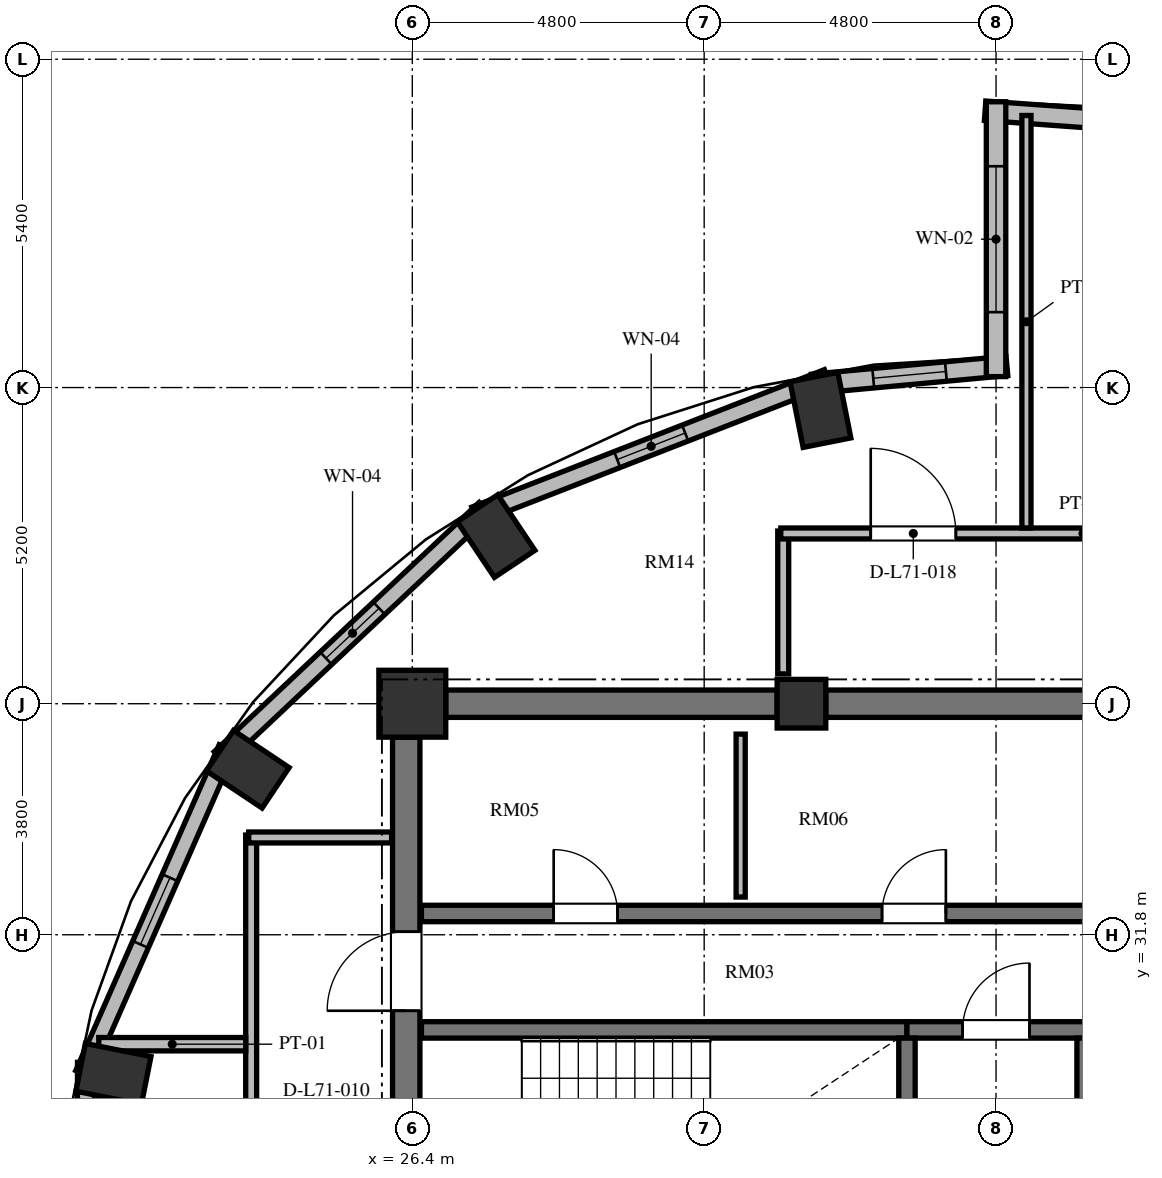
"""IFC4 building model, lengths in metres.
Left out: names, types, materials, properties, quantities, classifications, styles, units other than length and angle.
Written with IfcOpenShell. Run it as: python <this file> out.ifc"""

import sys

from ifc_helpers import new_model, si_unit, direction, frame, frame_2d, origin, origin_2d, place, context, subcontext, project, spatial, rectangle, extrude, element, fill, save


model = new_model("IFC4")
c1 = context("Model", 3, precision=1e-05, world=origin(), true_north=direction((0.0, 1.0)))
c2 = subcontext(c1, "Body", "Model", "MODEL_VIEW")
j1 = project(units=[si_unit("LENGTHUNIT", "METRE"), si_unit("PLANEANGLEUNIT", "RADIAN")], contexts=[c1])
p1 = place(None, origin())
s1 = spatial("IfcSite", under=j1, at=p1, CompositionType="ELEMENT")
p2 = place(p1, origin())
s2 = spatial("IfcBuilding", under=s1, at=p2, CompositionType="ELEMENT")
p3 = place(p2, frame((0.0, 0.0, 273.264)))
s3 = spatial("IfcBuildingStorey", under=s2, at=p3, CompositionType="ELEMENT", Elevation=273.264)
for number, where, z_axis, x_axis in (
    (1, (33.113, 40.433, 0.0), (0.0, 0.0, 1.0), (-0.195, 0.981, 0.0)),
    (2, (27.778, 38.357, 0.0), (0.0, 0.0, 1.0), (-0.556, 0.831, 0.0)),
    (3, (23.694, 34.522, 0.0), (0.0, 0.0, 1.0), (-0.831, 0.556, 0.0)),
    (4, (21.484, 29.512, 0.0), (0.0, 0.0, 1.0), (-0.981, 0.195, 0.0)),
):
    element("IfcColumn", number, at=place(p3, frame(where, z_axis=z_axis, x_axis=x_axis)), inside=s3, PredefinedType="COLUMN", context=c2, shape_type="SweptSolid", body=[
        extrude(rectangle(XDim=1.1, YDim=0.8, at=origin_2d()), origin(), (0.0, 0.0, 1.0), 3.648),
    ])
p4 = place(p3, frame((32.8, 35.6, 0.0), z_axis=(0.0, 0.0, 1.0), x_axis=(1.0, 0.0, 0.0)))
e5 = element("IfcColumn", 5, at=p4, inside=s3, PredefinedType="COLUMN", context=c2, shape_type="SweptSolid", body=[
    extrude(rectangle(XDim=0.8, YDim=0.8, at=origin_2d()), origin(), (0.0, 0.0, 1.0), 3.648),
])
p5 = place(p3, frame((26.4, 35.6, 0.0), z_axis=(0.0, 0.0, 1.0), x_axis=(1.0, 0.0, 0.0)))
e6 = element("IfcColumn", 6, at=p5, inside=s3, PredefinedType="COLUMN", context=c2, shape_type="SweptSolid", body=[
    extrude(rectangle(XDim=1.1, YDim=1.1, at=origin_2d()), origin(), (0.0, 0.0, 1.0), 3.648),
])
p6 = place(p3, frame((26.3, 20.95, 0.0), z_axis=(0.0, 0.0, 1.0), x_axis=(0.0, 1.0, 0.0)))
e7 = element("IfcWall", 7, at=p6, inside=s3, PredefinedType="SHEAR", context=c2, shape_type="SweptSolid", body=[
    extrude(rectangle(XDim=14.1, YDim=0.45, at=frame_2d((7.05, 0.0))), origin(), (0.0, 0.0, 1.0), 3.648),
])
p7 = place(p6, frame((6.5, 0.0, 0.0)))
e8 = element("IfcOpeningElement", 8, at=p7, cuts=e7, PredefinedType="OPENING", context=c2, shape_type="SweptSolid", body=[
    extrude(rectangle(XDim=1.2, YDim=2.15, at=frame_2d((0.6, 1.075))), frame((0.0, 0.235, 0.0), z_axis=(0.0, -1.0, 0.0), x_axis=(1.0, 0.0, 0.0)), (0.0, 0.0, 1.0), 0.47),
])
p8 = place(p6, frame((9.6, 0.0, 0.0)))
e9 = element("IfcOpeningElement", 9, at=p8, cuts=e7, PredefinedType="OPENING", context=c2, shape_type="SweptSolid", body=[
    extrude(rectangle(XDim=1.3, YDim=2.2, at=frame_2d((0.65, 1.1))), frame((0.0, 0.235, 0.0), z_axis=(0.0, -1.0, 0.0), x_axis=(1.0, 0.0, 0.0)), (0.0, 0.0, 1.0), 0.47),
])
p9 = place(p6, frame((3.26, 0.0, 0.0)))
e10 = element("IfcOpeningElement", 10, at=p9, cuts=e7, PredefinedType="OPENING", context=c2, shape_type="SweptSolid", body=[
    extrude(rectangle(XDim=1.3, YDim=2.2, at=frame_2d((0.65, 1.1))), frame((0.0, 0.235, 0.0), z_axis=(0.0, -1.0, 0.0), x_axis=(1.0, 0.0, 0.0)), (0.0, 0.0, 1.0), 0.47),
])
p10 = place(p3, frame((26.95, 35.6, 0.0), z_axis=(0.0, 0.0, 1.0), x_axis=(1.0, 0.0, 0.0)))
e11 = element("IfcWall", 11, at=p10, inside=s3, PredefinedType="SHEAR", context=c2, shape_type="SweptSolid", body=[
    extrude(rectangle(XDim=5.45, YDim=0.45, at=frame_2d((2.725, 0.0))), origin(), (0.0, 0.0, 1.0), 3.648),
])
p11 = place(p3, frame((33.2, 35.6, 0.0), z_axis=(0.0, 0.0, 1.0), x_axis=(1.0, 0.0, 0.0)))
e12 = element("IfcWall", 12, at=p11, inside=s3, PredefinedType="SHEAR", context=c2, shape_type="SweptSolid", body=[
    extrude(rectangle(XDim=5.6, YDim=0.45, at=frame_2d((2.8, 0.0))), origin(), (0.0, 0.0, 1.0), 3.648),
])
p12 = place(p3, frame((33.228, 40.964, 0.0), z_axis=(0.0, 0.0, 1.0), x_axis=(-0.931716550814, -0.36318627306, 0.0)))
e13 = element("IfcWall", 13, at=p12, inside=s3, PredefinedType="SOLIDWALL", context=c2, shape_type="SweptSolid", body=[
    extrude(rectangle(XDim=6.224, YDim=0.28, at=frame_2d((3.112, 0.0))), origin(), (0.0, 0.0, 1.0), 3.448),
])
p13 = place(p12, frame((2.512, 0.0, 0.85)))
e14 = element("IfcOpeningElement", 14, at=p13, cuts=e13, PredefinedType="OPENING", context=c2, shape_type="SweptSolid", body=[
    extrude(rectangle(XDim=1.2, YDim=1.8, at=frame_2d((0.6, 0.9))), frame((0.0, 0.15, 0.0), z_axis=(0.0, -1.0, 0.0), x_axis=(1.0, 0.0, 0.0)), (0.0, 0.0, 1.0), 0.3),
])
p14 = place(p3, frame((27.595, 38.808, 0.0), z_axis=(0.0, 0.0, 1.0), x_axis=(-0.728251519923, -0.685309947199, 0.0)))
e15 = element("IfcWall", 15, at=p14, inside=s3, PredefinedType="SOLIDWALL", context=c2, shape_type="SweptSolid", body=[
    extrude(rectangle(XDim=5.981, YDim=0.28, at=frame_2d((2.99, 0.0))), origin(), (0.0, 0.0, 1.0), 3.448),
])
p15 = place(p14, frame((2.391, 0.0, 0.85)))
e16 = element("IfcOpeningElement", 16, at=p15, cuts=e15, PredefinedType="OPENING", context=c2, shape_type="SweptSolid", body=[
    extrude(rectangle(XDim=1.2, YDim=1.8, at=frame_2d((0.6, 0.9))), frame((0.0, 0.15, 0.0), z_axis=(0.0, -1.0, 0.0), x_axis=(1.0, 0.0, 0.0)), (0.0, 0.0, 1.0), 0.3),
])
p16 = place(p3, frame((23.352, 34.869, 0.0), z_axis=(0.0, 0.0, 1.0), x_axis=(-0.402882523888, -0.915251698685, 0.0)))
e17 = element("IfcWall", 17, at=p16, inside=s3, PredefinedType="SOLIDWALL", context=c2, shape_type="SweptSolid", body=[
    extrude(rectangle(XDim=5.856, YDim=0.28, at=frame_2d((2.928, 0.0))), origin(), (0.0, 0.0, 1.0), 3.448),
])
p17 = place(p16, frame((2.328, 0.0, 0.85)))
e18 = element("IfcOpeningElement", 18, at=p17, cuts=e17, PredefinedType="OPENING", context=c2, shape_type="SweptSolid", body=[
    extrude(rectangle(XDim=1.2, YDim=1.8, at=frame_2d((0.6, 0.9))), frame((0.0, 0.15, 0.0), z_axis=(0.0, -1.0, 0.0), x_axis=(1.0, 0.0, 0.0)), (0.0, 0.0, 1.0), 0.3),
])
p18 = place(p3, frame((21.033, 29.701, 0.0), z_axis=(0.0, 0.0, 1.0), x_axis=(0.0, -1.0, 0.0)))
e19 = element("IfcWall", 19, at=p18, inside=s3, PredefinedType="SOLIDWALL", context=c2, shape_type="SweptSolid", body=[
    extrude(rectangle(XDim=5.803, YDim=0.28, at=frame_2d((2.901, 0.0))), origin(), (0.0, 0.0, 1.0), 3.448),
])
p19 = place(p18, frame((2.187, 0.0, 0.85)))
e20 = element("IfcOpeningElement", 20, at=p19, cuts=e19, PredefinedType="OPENING", context=c2, shape_type="SweptSolid", body=[
    extrude(rectangle(XDim=1.2, YDim=1.8, at=frame_2d((0.6, 0.9))), frame((0.0, 0.15, 0.0), z_axis=(0.0, -1.0, 0.0), x_axis=(1.0, 0.0, 0.0)), (0.0, 0.0, 1.0), 0.3),
])
p20 = place(p3, frame((40.35, 45.026, 0.0), z_axis=(0.0, 0.0, 1.0), x_axis=(-0.997412917451, 0.071885131294, 0.0)))
e21 = element("IfcWall", 21, at=p20, inside=s3, PredefinedType="SOLIDWALL", context=c2, shape_type="SweptSolid", body=[
    extrude(rectangle(XDim=4.541, YDim=0.32, at=frame_2d((2.271, 0.0))), origin(), (0.0, 0.0, 1.0), 3.448),
])
p21 = place(p20, frame((1.67, 0.0, 0.85)))
e22 = element("IfcOpeningElement", 22, at=p21, cuts=e21, PredefinedType="OPENING", context=c2, shape_type="SweptSolid", body=[
    extrude(rectangle(XDim=1.2, YDim=2.2, at=frame_2d((0.6, 1.1))), frame((0.0, 0.17, 0.0), z_axis=(0.0, -1.0, 0.0), x_axis=(1.0, 0.0, 0.0)), (0.0, 0.0, 1.0), 0.34),
])
p22 = place(p3, frame((36.179, 41.156, 0.0), z_axis=(0.0, 0.0, 1.0), x_axis=(-0.995736155144, -0.092247001792, 0.0)))
e23 = element("IfcWall", 23, at=p22, inside=s3, PredefinedType="SOLIDWALL", context=c2, shape_type="SweptSolid", body=[
    extrude(rectangle(XDim=3.216, YDim=0.32, at=frame_2d((1.608, 0.0))), origin(), (0.0, 0.0, 1.0), 3.448),
])
p23 = place(p22, frame((1.008, 0.0, 0.85)))
e24 = element("IfcOpeningElement", 24, at=p23, cuts=e23, PredefinedType="OPENING", context=c2, shape_type="SweptSolid", body=[
    extrude(rectangle(XDim=1.2, YDim=1.8, at=frame_2d((0.6, 0.9))), frame((0.0, 0.17, 0.0), z_axis=(0.0, -1.0, 0.0), x_axis=(1.0, 0.0, 0.0)), (0.0, 0.0, 1.0), 0.34),
])
p24 = place(p3, frame((36.0, 45.5, 0.0), z_axis=(0.0, 0.0, 1.0), x_axis=(0.0, -1.0, 0.0)))
e25 = element("IfcWall", 25, at=p24, inside=s3, PredefinedType="SOLIDWALL", context=c2, shape_type="SweptSolid", body=[
    extrude(rectangle(XDim=4.52, YDim=0.32, at=frame_2d((2.26, 0.0))), origin(), (0.0, 0.0, 1.0), 3.448),
])
p25 = place(p24, frame((1.06, 0.0, 0.84)))
e26 = element("IfcOpeningElement", 26, at=p25, cuts=e25, PredefinedType="OPENING", context=c2, shape_type="SweptSolid", body=[
    extrude(rectangle(XDim=2.4, YDim=2.04, at=frame_2d((1.2, 1.02))), frame((0.0, 0.17, 0.0), z_axis=(0.0, -1.0, 0.0), x_axis=(1.0, 0.0, 0.0)), (0.0, 0.0, 1.0), 0.34),
])
p26 = place(p3, frame((26.55, 30.235, 0.0), z_axis=(0.0, 0.0, 1.0), x_axis=(1.0, 0.0, 0.0)))
e27 = element("IfcWall", 27, at=p26, inside=s3, PredefinedType="SHEAR", context=c2, shape_type="SweptSolid", body=[
    extrude(rectangle(XDim=7.985, YDim=0.27, at=frame_2d((3.992, 0.0))), origin(), (0.0, 0.0, 1.0), 3.648),
])
p27 = place(p3, frame((34.535, 30.235, 0.0), z_axis=(0.0, 0.0, 1.0), x_axis=(1.0, 0.0, 0.0)))
e28 = element("IfcWall", 28, at=p27, inside=s3, PredefinedType="SHEAR", context=c2, shape_type="SweptSolid", body=[
    extrude(rectangle(XDim=2.93, YDim=0.27, at=frame_2d((1.465, 0.0))), origin(), (0.0, 0.0, 1.0), 3.648),
])
p28 = place(p27, frame((0.915, 0.0, 0.0)))
e29 = element("IfcOpeningElement", 29, at=p28, cuts=e28, PredefinedType="OPENING", context=c2, shape_type="SweptSolid", body=[
    extrude(rectangle(XDim=1.1, YDim=2.15, at=frame_2d((0.55, 1.075))), frame((0.0, 0.145, 0.0), z_axis=(0.0, -1.0, 0.0), x_axis=(1.0, 0.0, 0.0)), (0.0, 0.0, 1.0), 0.29),
])
for number, where, z_axis, x_axis in (
    (30, (34.535, 26.02, 0.0), (0.0, 0.0, 1.0), (0.0, 1.0, 0.0)),
    (31, (37.465, 26.02, 0.0), (0.0, 0.0, 1.0), (0.0, 1.0, 0.0)),
):
    element("IfcWall", number, at=place(p3, frame(where, z_axis=z_axis, x_axis=x_axis)), inside=s3, PredefinedType="SHEAR", context=c2, shape_type="SweptSolid", body=[
        extrude(rectangle(XDim=4.08, YDim=0.27, at=frame_2d((2.04, 0.0))), origin(), (0.0, 0.0, 1.0), 3.648),
    ])
p29 = place(p3, frame((26.55, 32.15, 0.0), z_axis=(0.0, 0.0, 1.0), x_axis=(1.0, 0.0, 0.0)))
e32 = element("IfcWall", 32, at=p29, inside=s3, PredefinedType="SHEAR", context=c2, shape_type="SweptSolid", body=[
    extrude(rectangle(XDim=16.4, YDim=0.27, at=frame_2d((8.2, 0.0))), origin(), (0.0, 0.0, 1.0), 3.648),
])
p30 = place(p29, frame((2.175, 0.0, 0.0)))
e33 = element("IfcOpeningElement", 33, at=p30, cuts=e32, PredefinedType="OPENING", context=c2, shape_type="SweptSolid", body=[
    extrude(rectangle(XDim=1.05, YDim=2.15, at=frame_2d((0.525, 1.075))), frame((0.0, 0.145, 0.0), z_axis=(0.0, -1.0, 0.0), x_axis=(1.0, 0.0, 0.0)), (0.0, 0.0, 1.0), 0.29),
])
p31 = place(p29, frame((7.575, 0.0, 0.0)))
e34 = element("IfcOpeningElement", 34, at=p31, cuts=e32, PredefinedType="OPENING", context=c2, shape_type="SweptSolid", body=[
    extrude(rectangle(XDim=1.05, YDim=2.15, at=frame_2d((0.525, 1.075))), frame((0.0, 0.145, 0.0), z_axis=(0.0, -1.0, 0.0), x_axis=(1.0, 0.0, 0.0)), (0.0, 0.0, 1.0), 0.29),
])
p32 = place(p29, frame((11.9, 0.0, 0.0)))
e35 = element("IfcOpeningElement", 35, at=p32, cuts=e32, PredefinedType="OPENING", context=c2, shape_type="SweptSolid", body=[
    extrude(rectangle(XDim=1.1, YDim=2.2, at=frame_2d((0.55, 1.1))), frame((0.0, 0.145, 0.0), z_axis=(0.0, -1.0, 0.0), x_axis=(1.0, 0.0, 0.0)), (0.0, 0.0, 1.0), 0.29),
])
p33 = place(p29, frame((14.5, 0.0, 0.0)))
e36 = element("IfcOpeningElement", 36, at=p33, cuts=e32, PredefinedType="OPENING", context=c2, shape_type="SweptSolid", body=[
    extrude(rectangle(XDim=1.1, YDim=2.2, at=frame_2d((0.55, 1.1))), frame((0.0, 0.145, 0.0), z_axis=(0.0, -1.0, 0.0), x_axis=(1.0, 0.0, 0.0)), (0.0, 0.0, 1.0), 0.29),
])
p34 = place(p3, frame((31.8, 32.42, 0.0), z_axis=(0.0, 0.0, 1.0), x_axis=(0.0, 1.0, 0.0)))
e37 = element("IfcWall", 37, at=p34, inside=s3, PredefinedType="PARTITIONING", context=c2, shape_type="SweptSolid", body=[
    extrude(rectangle(XDim=2.68, YDim=0.15, at=frame_2d((1.34, 0.0))), origin(), (0.0, 0.0, 1.0), 3.448),
])
p35 = place(p3, frame((32.5, 36.09, 0.0), z_axis=(0.0, 0.0, 1.0), x_axis=(0.0, 1.0, 0.0)))
e38 = element("IfcWall", 38, at=p35, inside=s3, PredefinedType="PARTITIONING", context=c2, shape_type="SweptSolid", body=[
    extrude(rectangle(XDim=2.35, YDim=0.18, at=frame_2d((1.175, 0.0))), origin(), (0.0, 0.0, 1.0), 3.448),
])
p36 = place(p3, frame((32.46, 38.4, 0.0), z_axis=(0.0, 0.0, 1.0), x_axis=(1.0, 0.0, 0.0)))
e39 = element("IfcWall", 39, at=p36, inside=s3, PredefinedType="PARTITIONING", context=c2, shape_type="SweptSolid", body=[
    extrude(rectangle(XDim=19.879, YDim=0.18, at=frame_2d((9.939, 0.0))), origin(), (0.0, 0.0, 1.0), 3.073),
])
p37 = place(p36, frame((16.101, 0.0, 0.0)))
e40 = element("IfcOpeningElement", 40, at=p37, cuts=e39, PredefinedType="OPENING", context=c2, shape_type="SweptSolid", body=[
    extrude(rectangle(XDim=1.4, YDim=2.2, at=frame_2d((0.7, 1.1))), frame((0.0, 0.1, 0.0), z_axis=(0.0, -1.0, 0.0), x_axis=(1.0, 0.0, 0.0)), (0.0, 0.0, 1.0), 0.2),
])
p38 = place(p36, frame((10.84, 0.0, 0.0)))
e41 = element("IfcOpeningElement", 41, at=p38, cuts=e39, PredefinedType="OPENING", context=c2, shape_type="SweptSolid", body=[
    extrude(rectangle(XDim=1.4, YDim=2.2, at=frame_2d((0.7, 1.1))), frame((0.0, 0.1, 0.0), z_axis=(0.0, -1.0, 0.0), x_axis=(1.0, 0.0, 0.0)), (0.0, 0.0, 1.0), 0.2),
])
p39 = place(p36, frame((5.84, 0.0, 0.0)))
e42 = element("IfcOpeningElement", 42, at=p39, cuts=e39, PredefinedType="OPENING", context=c2, shape_type="SweptSolid", body=[
    extrude(rectangle(XDim=1.4, YDim=2.2, at=frame_2d((0.7, 1.1))), frame((0.0, 0.1, 0.0), z_axis=(0.0, -1.0, 0.0), x_axis=(1.0, 0.0, 0.0)), (0.0, 0.0, 1.0), 0.2),
])
p40 = place(p36, frame((1.479, 0.0, 0.0)))
e43 = element("IfcOpeningElement", 43, at=p40, cuts=e39, PredefinedType="OPENING", context=c2, shape_type="SweptSolid", body=[
    extrude(rectangle(XDim=1.4, YDim=2.2, at=frame_2d((0.7, 1.1))), frame((0.0, 0.1, 0.0), z_axis=(0.0, -1.0, 0.0), x_axis=(1.0, 0.0, 0.0)), (0.0, 0.0, 1.0), 0.2),
])
p41 = place(p3, frame((23.75, 22.16, 0.0), z_axis=(0.0, 0.0, 1.0), x_axis=(0.0, 1.0, 0.0)))
e44 = element("IfcWall", 44, at=p41, inside=s3, PredefinedType="PARTITIONING", context=c2, shape_type="SweptSolid", body=[
    extrude(rectangle(XDim=11.28, YDim=0.18, at=frame_2d((5.64, 0.0))), origin(), (0.0, 0.0, 1.0), 3.448),
])
p42 = place(p41, frame((5.123, 0.0, 0.0)))
e45 = element("IfcOpeningElement", 45, at=p42, cuts=e44, PredefinedType="OPENING", context=c2, shape_type="SweptSolid", body=[
    extrude(rectangle(XDim=1.4, YDim=2.2, at=frame_2d((0.7, 1.1))), frame((0.0, 0.1, 0.0), z_axis=(0.0, -1.0, 0.0), x_axis=(1.0, 0.0, 0.0)), (0.0, 0.0, 1.0), 0.2),
])
p43 = place(p41, frame((1.379, 0.0, 0.0)))
e46 = element("IfcOpeningElement", 46, at=p43, cuts=e44, PredefinedType="OPENING", context=c2, shape_type="SweptSolid", body=[
    extrude(rectangle(XDim=1.4, YDim=2.2, at=frame_2d((0.7, 1.1))), frame((0.0, 0.1, 0.0), z_axis=(0.0, -1.0, 0.0), x_axis=(1.0, 0.0, 0.0)), (0.0, 0.0, 1.0), 0.2),
])
p44 = place(p3, frame((23.71, 33.4, 0.0), z_axis=(0.0, 0.0, 1.0), x_axis=(1.0, 0.0, 0.0)))
e47 = element("IfcWall", 47, at=p44, inside=s3, PredefinedType="PARTITIONING", context=c2, shape_type="SweptSolid", body=[
    extrude(rectangle(XDim=2.35, YDim=0.18, at=frame_2d((1.175, 0.0))), origin(), (0.0, 0.0, 1.0), 3.448),
])
p45 = place(p3, frame((21.244, 30.0, 0.0), z_axis=(0.0, 0.0, 1.0), x_axis=(1.0, 0.0, 0.0)))
e48 = element("IfcWall", 48, at=p45, inside=s3, PredefinedType="PARTITIONING", context=c2, shape_type="SweptSolid", body=[
    extrude(rectangle(XDim=2.416, YDim=0.22, at=frame_2d((1.208, 0.0))), origin(), (0.0, 0.0, 1.0), 3.448),
])
p46 = place(p3, frame((36.5, 38.49, 0.0), z_axis=(0.0, 0.0, 1.0), x_axis=(0.0, 1.0, 0.0)))
e49 = element("IfcWall", 49, at=p46, inside=s3, PredefinedType="PARTITIONING", context=c2, shape_type="SweptSolid", body=[
    extrude(rectangle(XDim=6.785, YDim=0.15, at=frame_2d((3.392, 0.0))), origin(), (0.0, 0.0, 1.0), 3.448),
])
p47 = place(p13, origin())
e50 = element("IfcWindow", 50, at=p47, inside=s3, PartitioningType="SINGLE_PANEL", PredefinedType="WINDOW", context=c2, shape_type="SweptSolid", body=[
    extrude(rectangle(XDim=1.2, YDim=1.8, at=frame_2d((0.6, 0.9))), frame((0.0, 0.03, 0.0), z_axis=(0.0, -1.0, 0.0), x_axis=(1.0, 0.0, 0.0)), (0.0, 0.0, 1.0), 0.06),
])
fill(e14, e50)
p48 = place(p15, origin())
e51 = element("IfcWindow", 51, at=p48, inside=s3, PartitioningType="SINGLE_PANEL", PredefinedType="WINDOW", context=c2, shape_type="SweptSolid", body=[
    extrude(rectangle(XDim=1.2, YDim=1.8, at=frame_2d((0.6, 0.9))), frame((0.0, 0.03, 0.0), z_axis=(0.0, -1.0, 0.0), x_axis=(1.0, 0.0, 0.0)), (0.0, 0.0, 1.0), 0.06),
])
fill(e16, e51)
p49 = place(p17, origin())
e52 = element("IfcWindow", 52, at=p49, inside=s3, PartitioningType="SINGLE_PANEL", PredefinedType="WINDOW", context=c2, shape_type="SweptSolid", body=[
    extrude(rectangle(XDim=1.2, YDim=1.8, at=frame_2d((0.6, 0.9))), frame((0.0, 0.03, 0.0), z_axis=(0.0, -1.0, 0.0), x_axis=(1.0, 0.0, 0.0)), (0.0, 0.0, 1.0), 0.06),
])
fill(e18, e52)
p50 = place(p23, origin())
e53 = element("IfcWindow", 53, at=p50, inside=s3, PartitioningType="SINGLE_PANEL", PredefinedType="WINDOW", context=c2, shape_type="SweptSolid", body=[
    extrude(rectangle(XDim=1.2, YDim=1.8, at=frame_2d((0.6, 0.9))), frame((0.0, 0.03, 0.0), z_axis=(0.0, -1.0, 0.0), x_axis=(1.0, 0.0, 0.0)), (0.0, 0.0, 1.0), 0.06),
])
fill(e24, e53)
p51 = place(p25, origin())
e54 = element("IfcWindow", 54, at=p51, inside=s3, PartitioningType="SINGLE_PANEL", PredefinedType="WINDOW", context=c2, shape_type="SweptSolid", body=[
    extrude(rectangle(XDim=2.4, YDim=2.04, at=frame_2d((1.2, 1.02))), frame((0.0, 0.03, 0.0), z_axis=(0.0, -1.0, 0.0), x_axis=(1.0, 0.0, 0.0)), (0.0, 0.0, 1.0), 0.06),
])
fill(e26, e54)
p52 = place(p28, origin())
e55 = element("IfcDoor", 55, at=p52, inside=s3, OperationType="SINGLE_SWING_RIGHT", PredefinedType="DOOR", context=c2, shape_type="SweptSolid", body=[
    extrude(rectangle(XDim=1.1, YDim=2.15, at=frame_2d((0.55, 1.075))), frame((0.0, 0.025, 0.0), z_axis=(0.0, -1.0, 0.0), x_axis=(1.0, 0.0, 0.0)), (0.0, 0.0, 1.0), 0.05),
])
fill(e29, e55)
p53 = place(p8, origin())
e56 = element("IfcDoor", 56, at=p53, inside=s3, OperationType="SINGLE_SWING_LEFT", PredefinedType="DOOR", context=c2, shape_type="SweptSolid", body=[
    extrude(rectangle(XDim=1.3, YDim=2.2, at=frame_2d((0.65, 1.1))), frame((0.0, 0.025, 0.0), z_axis=(0.0, -1.0, 0.0), x_axis=(1.0, 0.0, 0.0)), (0.0, 0.0, 1.0), 0.05),
])
fill(e9, e56)
p54 = place(p30, origin())
e57 = element("IfcDoor", 57, at=p54, inside=s3, OperationType="SINGLE_SWING_LEFT", PredefinedType="DOOR", context=c2, shape_type="SweptSolid", body=[
    extrude(rectangle(XDim=1.05, YDim=2.15, at=frame_2d((0.525, 1.075))), frame((0.0, 0.025, 0.0), z_axis=(0.0, -1.0, 0.0), x_axis=(1.0, 0.0, 0.0)), (0.0, 0.0, 1.0), 0.05),
])
fill(e33, e57)
p55 = place(p31, origin())
e58 = element("IfcDoor", 58, at=p55, inside=s3, OperationType="SINGLE_SWING_RIGHT", PredefinedType="DOOR", context=c2, shape_type="SweptSolid", body=[
    extrude(rectangle(XDim=1.05, YDim=2.15, at=frame_2d((0.525, 1.075))), frame((0.0, 0.025, 0.0), z_axis=(0.0, -1.0, 0.0), x_axis=(1.0, 0.0, 0.0)), (0.0, 0.0, 1.0), 0.05),
])
fill(e34, e58)
p56 = place(p40, origin())
e59 = element("IfcDoor", 59, at=p56, inside=s3, OperationType="SINGLE_SWING_LEFT", PredefinedType="DOOR", context=c2, shape_type="SweptSolid", body=[
    extrude(rectangle(XDim=1.4, YDim=2.2, at=frame_2d((0.7, 1.1))), frame((0.0, 0.025, 0.0), z_axis=(0.0, -1.0, 0.0), x_axis=(1.0, 0.0, 0.0)), (0.0, 0.0, 1.0), 0.05),
])
fill(e43, e59)
save(model, sys.argv[1])
